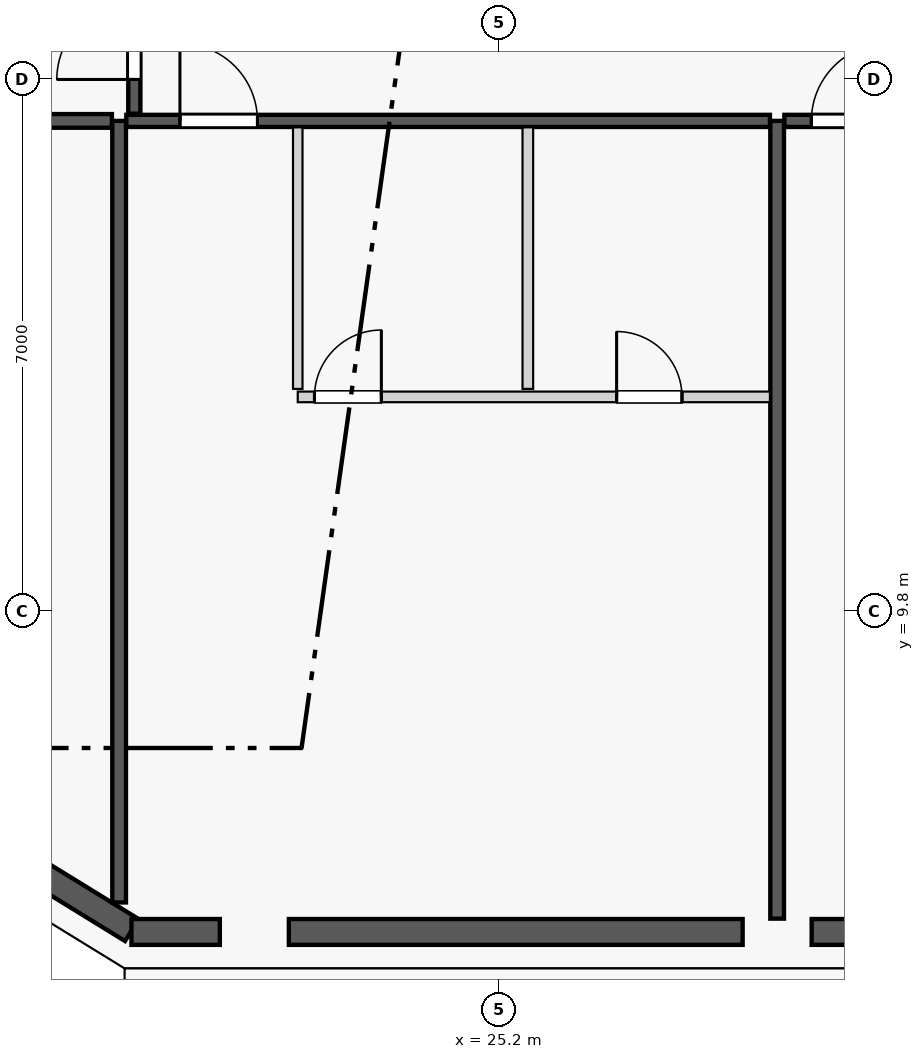
"""IFC4 building model, lengths in metres.
Left out: names, types, materials, properties, quantities, classifications, styles, units other than length and angle.
Written with IfcOpenShell. Run it as: python <this file> out.ifc"""

import sys

from ifc_helpers import new_model, si_unit, direction, frame, frame_2d, origin, origin_2d, place, context, subcontext, project, spatial, rectangle, extrude, element, fill, save


model = new_model("IFC4")
c1 = context("Model", 3, precision=1e-05, world=origin(), true_north=direction((0.0, 1.0)))
c2 = subcontext(c1, "Body", "Model", "MODEL_VIEW")
j1 = project(units=[si_unit("LENGTHUNIT", "METRE"), si_unit("PLANEANGLEUNIT", "RADIAN")], contexts=[c1])
p1 = place(None, origin())
s1 = spatial("IfcSite", under=j1, at=p1, CompositionType="ELEMENT")
p2 = place(p1, origin())
s2 = spatial("IfcBuilding", under=s1, at=p2, CompositionType="ELEMENT")
p3 = place(p2, frame((0.0, 0.0, 186.1)))
s3 = spatial("IfcBuildingStorey", under=s2, at=p3, CompositionType="ELEMENT", Elevation=186.1)
for number, where, z_axis, x_axis in (
    (1, (21.979, 5.589, 0.0), (0.0, 0.0, 1.0), (1.0, 0.0, 0.0)),
    (2, (28.857, 5.642, 0.0), (0.0, 0.0, 1.0), (1.0, 0.0, 0.0)),
):
    element("IfcColumn", number, at=place(p3, frame(where, z_axis=z_axis, x_axis=x_axis)), inside=s3, PredefinedType="COLUMN", context=c2, shape_type="SweptSolid", body=[
        extrude(rectangle(XDim=0.9, YDim=0.9, at=origin_2d()), origin(), (0.0, 0.0, 1.0), 3.55),
    ])
p4 = place(p3, frame((20.142, 6.654, 0.0), z_axis=(0.0, 0.0, 1.0), x_axis=(0.865230187018, -0.501374833306, 0.0)))
e3 = element("IfcColumn", 3, at=p4, inside=s3, PredefinedType="PILASTER", context=c2, shape_type="SweptSolid", body=[
    extrude(rectangle(XDim=0.5, YDim=0.35, at=origin_2d()), origin(), (0.0, 0.0, 1.0), 3.55),
])
p5 = place(p3, frame((18.938, 6.484, 0.0), z_axis=(0.0, 0.0, 1.0), x_axis=(0.851778214877, -0.523902541185, 0.0)))
e4 = element("IfcWall", 4, at=p5, inside=s3, PredefinedType="STANDARD", context=c2, shape_type="SweptSolid", body=[
    extrude(rectangle(XDim=1.678, YDim=0.34, at=frame_2d((0.839, 0.0))), origin(), (0.0, 0.0, 1.0), 3.35),
])
p6 = place(p3, frame((20.362, 5.58, 0.0), z_axis=(0.0, 0.0, 1.0), x_axis=(1.0, 0.0, 0.0)))
e5 = element("IfcWall", 5, at=p6, inside=s3, PredefinedType="STANDARD", context=c2, shape_type="SweptSolid", body=[
    extrude(rectangle(XDim=1.163, YDim=0.34, at=frame_2d((0.582, 0.0))), origin(), (0.0, 0.0, 1.0), 3.35),
])
p7 = place(p3, frame((22.433, 5.58, 0.0), z_axis=(0.0, 0.0, 1.0), x_axis=(1.0, 0.0, 0.0)))
e6 = element("IfcWall", 6, at=p7, inside=s3, PredefinedType="STANDARD", context=c2, shape_type="SweptSolid", body=[
    extrude(rectangle(XDim=5.97, YDim=0.34, at=frame_2d((2.985, 0.0))), origin(), (0.0, 0.0, 1.0), 2.883),
])
p8 = place(p7, frame((2.435, 0.0, 0.75)))
e7 = element("IfcOpeningElement", 7, at=p8, cuts=e6, PredefinedType="OPENING", context=c2, shape_type="SweptSolid", body=[
    extrude(rectangle(XDim=1.1, YDim=1.983, at=frame_2d((0.55, 0.991))), frame((0.0, 0.18, 0.0), z_axis=(0.0, -1.0, 0.0), x_axis=(1.0, 0.0, 0.0)), (0.0, 0.0, 1.0), 0.36),
])
p9 = place(p3, frame((29.311, 5.58, 0.0), z_axis=(0.0, 0.0, 1.0), x_axis=(1.0, 0.0, 0.0)))
e8 = element("IfcWall", 8, at=p9, inside=s3, PredefinedType="STANDARD", context=c2, shape_type="SweptSolid", body=[
    extrude(rectangle(XDim=6.178, YDim=0.34, at=frame_2d((3.089, 0.0))), origin(), (0.0, 0.0, 1.0), 2.883),
])
p10 = place(p9, frame((2.539, 0.0, 0.0)))
e9 = element("IfcOpeningElement", 9, at=p10, cuts=e8, PredefinedType="OPENING", context=c2, shape_type="SweptSolid", body=[
    extrude(rectangle(XDim=1.1, YDim=2.25, at=frame_2d((0.55, 1.125))), frame((0.0, 0.18, 0.0), z_axis=(0.0, -1.0, 0.0), x_axis=(1.0, 0.0, 0.0)), (0.0, 0.0, 1.0), 0.36),
])
p11 = place(p3, frame((20.2, 5.968, 0.0), z_axis=(0.0, 0.0, 1.0), x_axis=(0.0, 1.0, 0.0)))
e10 = element("IfcWall", 10, at=p11, inside=s3, PredefinedType="PARTITIONING", context=c2, shape_type="SweptSolid", body=[
    extrude(rectangle(XDim=10.282, YDim=0.18, at=frame_2d((5.141, 0.0))), origin(), (0.0, 0.0, 1.0), 3.35),
])
p12 = place(p3, frame((28.857, 5.755, 0.0), z_axis=(0.0, 0.0, 1.0), x_axis=(0.0, 1.0, 0.0)))
e11 = element("IfcWall", 11, at=p12, inside=s3, PredefinedType="PARTITIONING", context=c2, shape_type="SweptSolid", body=[
    extrude(rectangle(XDim=10.495, YDim=0.18, at=frame_2d((5.248, 0.0))), origin(), (0.0, 0.0, 1.0), 2.807),
])
p13 = place(p3, frame((20.295, 16.25, 0.0), z_axis=(0.0, 0.0, 1.0), x_axis=(1.0, 0.0, 0.0)))
e12 = element("IfcWall", 12, at=p13, inside=s3, PredefinedType="PARTITIONING", context=c2, shape_type="SweptSolid", body=[
    extrude(rectangle(XDim=8.467, YDim=0.16, at=frame_2d((4.233, 0.0))), origin(), (0.0, 0.0, 1.0), 3.35),
])
p14 = place(p13, frame((0.705, 0.0, 0.0)))
e13 = element("IfcOpeningElement", 13, at=p14, cuts=e12, PredefinedType="OPENING", context=c2, shape_type="SweptSolid", body=[
    extrude(rectangle(XDim=1.02, YDim=2.25, at=frame_2d((0.51, 1.125))), frame((0.0, 0.09, 0.0), z_axis=(0.0, -1.0, 0.0), x_axis=(1.0, 0.0, 0.0)), (0.0, 0.0, 1.0), 0.18),
])
p15 = place(p3, frame((22.55, 12.724, 0.0), z_axis=(0.0, 0.0, 1.0), x_axis=(0.0, 1.0, 0.0)))
e14 = element("IfcWall", 14, at=p15, inside=s3, PredefinedType="PARTITIONING", context=c2, shape_type="SweptSolid", body=[
    extrude(rectangle(XDim=3.441, YDim=0.125, at=frame_2d((1.72, 0.0))), origin(), (0.0, 0.0, 1.0), 2.807),
])
p16 = place(p3, frame((22.55, 12.619, 0.0), z_axis=(0.0, 0.0, 1.0), x_axis=(1.0, 0.0, 0.0)))
e15 = element("IfcWall", 15, at=p16, inside=s3, PredefinedType="PLUMBINGWALL", context=c2, shape_type="SweptSolid", body=[
    extrude(rectangle(XDim=6.212, YDim=0.14, at=frame_2d((3.106, 0.0))), origin(), (0.0, 0.0, 1.0), 3.35),
])
p17 = place(p16, frame((4.195, 0.0, 0.0)))
e16 = element("IfcOpeningElement", 16, at=p17, cuts=e15, PredefinedType="OPENING", context=c2, shape_type="SweptSolid", body=[
    extrude(rectangle(XDim=0.86, YDim=2.1, at=frame_2d((0.43, 1.05))), frame((0.0, 0.08, 0.0), z_axis=(0.0, -1.0, 0.0), x_axis=(1.0, 0.0, 0.0)), (0.0, 0.0, 1.0), 0.16),
])
p18 = place(p16, frame((0.22, 0.0, 0.0)))
e17 = element("IfcOpeningElement", 17, at=p18, cuts=e15, PredefinedType="OPENING", context=c2, shape_type="SweptSolid", body=[
    extrude(rectangle(XDim=0.88, YDim=2.15, at=frame_2d((0.44, 1.075))), frame((0.0, 0.08, 0.0), z_axis=(0.0, -1.0, 0.0), x_axis=(1.0, 0.0, 0.0)), (0.0, 0.0, 1.0), 0.16),
])
p19 = place(p3, frame((25.577, 12.724, 0.0), z_axis=(0.0, 0.0, 1.0), x_axis=(0.0, 1.0, 0.0)))
e18 = element("IfcWall", 18, at=p19, inside=s3, PredefinedType="PLUMBINGWALL", context=c2, shape_type="SweptSolid", body=[
    extrude(rectangle(XDim=3.441, YDim=0.14, at=frame_2d((1.72, 0.0))), origin(), (0.0, 0.0, 1.0), 3.35),
])
p20 = place(p3, frame((28.952, 16.25, 0.0), z_axis=(0.0, 0.0, 1.0), x_axis=(1.0, 0.0, 0.0)))
e19 = element("IfcWall", 19, at=p20, inside=s3, PredefinedType="PARTITIONING", context=c2, shape_type="SweptSolid", body=[
    extrude(rectangle(XDim=6.896, YDim=0.16, at=frame_2d((3.448, 0.0))), origin(), (0.0, 0.0, 1.0), 3.35),
])
p21 = place(p20, frame((0.355, 0.0, 0.0)))
e20 = element("IfcOpeningElement", 20, at=p21, cuts=e19, PredefinedType="OPENING", context=c2, shape_type="SweptSolid", body=[
    extrude(rectangle(XDim=1.02, YDim=2.25, at=frame_2d((0.51, 1.125))), frame((0.0, 0.09, 0.0), z_axis=(0.0, -1.0, 0.0), x_axis=(1.0, 0.0, 0.0)), (0.0, 0.0, 1.0), 0.18),
])
p22 = place(p3, frame((14.211, 16.25, 0.0), z_axis=(0.0, 0.0, 1.0), x_axis=(1.0, 0.0, 0.0)))
e21 = element("IfcWall", 21, at=p22, inside=s3, PredefinedType="PARTITIONING", context=c2, shape_type="SweptSolid", body=[
    extrude(rectangle(XDim=5.894, YDim=0.18, at=frame_2d((2.947, 0.0))), origin(), (0.0, 0.0, 1.0), 3.35),
])
p23 = place(p3, frame((20.4, 16.345, 0.0), z_axis=(0.0, 0.0, 1.0), x_axis=(0.0, 1.0, 0.0)))
e22 = element("IfcWall", 22, at=p23, inside=s3, PredefinedType="PARTITIONING", context=c2, shape_type="SweptSolid", body=[
    extrude(rectangle(XDim=8.504, YDim=0.16, at=frame_2d((4.252, 0.0))), origin(), (0.0, 0.0, 1.0), 3.35),
])
p24 = place(p23, frame((0.45, 0.0, 0.0)))
e23 = element("IfcOpeningElement", 23, at=p24, cuts=e22, PredefinedType="OPENING", context=c2, shape_type="SweptSolid", body=[
    extrude(rectangle(XDim=1.02, YDim=2.25, at=frame_2d((0.51, 1.125))), frame((0.0, 0.09, 0.0), z_axis=(0.0, -1.0, 0.0), x_axis=(1.0, 0.0, 0.0)), (0.0, 0.0, 1.0), 0.18),
])
p25 = place(p8, origin())
e24 = element("IfcWindow", 24, at=p25, inside=s3, PartitioningType="SINGLE_PANEL", PredefinedType="WINDOW", context=c2, shape_type="SweptSolid", body=[
    extrude(rectangle(XDim=1.1, YDim=1.983, at=frame_2d((0.55, 0.991))), frame((0.0, 0.03, 0.0), z_axis=(0.0, -1.0, 0.0), x_axis=(1.0, 0.0, 0.0)), (0.0, 0.0, 1.0), 0.06),
])
fill(e7, e24)
p26 = place(p17, origin())
e25 = element("IfcDoor", 25, at=p26, inside=s3, OperationType="SINGLE_SWING_LEFT", PredefinedType="DOOR", context=c2, shape_type="SweptSolid", body=[
    extrude(rectangle(XDim=0.86, YDim=2.1, at=frame_2d((0.43, 1.05))), frame((0.0, 0.025, 0.0), z_axis=(0.0, -1.0, 0.0), x_axis=(1.0, 0.0, 0.0)), (0.0, 0.0, 1.0), 0.05),
])
fill(e16, e25)
p27 = place(p14, origin())
e26 = element("IfcDoor", 26, at=p27, inside=s3, OperationType="SINGLE_SWING_LEFT", PredefinedType="DOOR", context=c2, shape_type="SweptSolid", body=[
    extrude(rectangle(XDim=1.02, YDim=2.25, at=frame_2d((0.51, 1.125))), frame((0.0, 0.025, 0.0), z_axis=(0.0, -1.0, 0.0), x_axis=(1.0, 0.0, 0.0)), (0.0, 0.0, 1.0), 0.05),
])
fill(e13, e26)
p28 = place(p18, origin())
e27 = element("IfcDoor", 27, at=p28, inside=s3, OperationType="SINGLE_SWING_RIGHT", PredefinedType="DOOR", context=c2, shape_type="SweptSolid", body=[
    extrude(rectangle(XDim=0.88, YDim=2.15, at=frame_2d((0.44, 1.075))), frame((0.0, 0.025, 0.0), z_axis=(0.0, -1.0, 0.0), x_axis=(1.0, 0.0, 0.0)), (0.0, 0.0, 1.0), 0.05),
])
fill(e17, e27)
p29 = place(p21, origin())
e28 = element("IfcDoor", 28, at=p29, inside=s3, OperationType="SINGLE_SWING_RIGHT", PredefinedType="DOOR", context=c2, shape_type="SweptSolid", body=[
    extrude(rectangle(XDim=1.02, YDim=2.25, at=frame_2d((0.51, 1.125))), frame((0.0, 0.025, 0.0), z_axis=(0.0, -1.0, 0.0), x_axis=(1.0, 0.0, 0.0)), (0.0, 0.0, 1.0), 0.05),
])
fill(e20, e28)
p30 = place(p24, origin())
e29 = element("IfcDoor", 29, at=p30, inside=s3, OperationType="SINGLE_SWING_LEFT", PredefinedType="DOOR", context=c2, shape_type="SweptSolid", body=[
    extrude(rectangle(XDim=1.02, YDim=2.25, at=frame_2d((0.51, 1.125))), frame((0.0, 0.025, 0.0), z_axis=(0.0, -1.0, 0.0), x_axis=(1.0, 0.0, 0.0)), (0.0, 0.0, 1.0), 0.05),
])
fill(e23, e29)
save(model, sys.argv[1])
